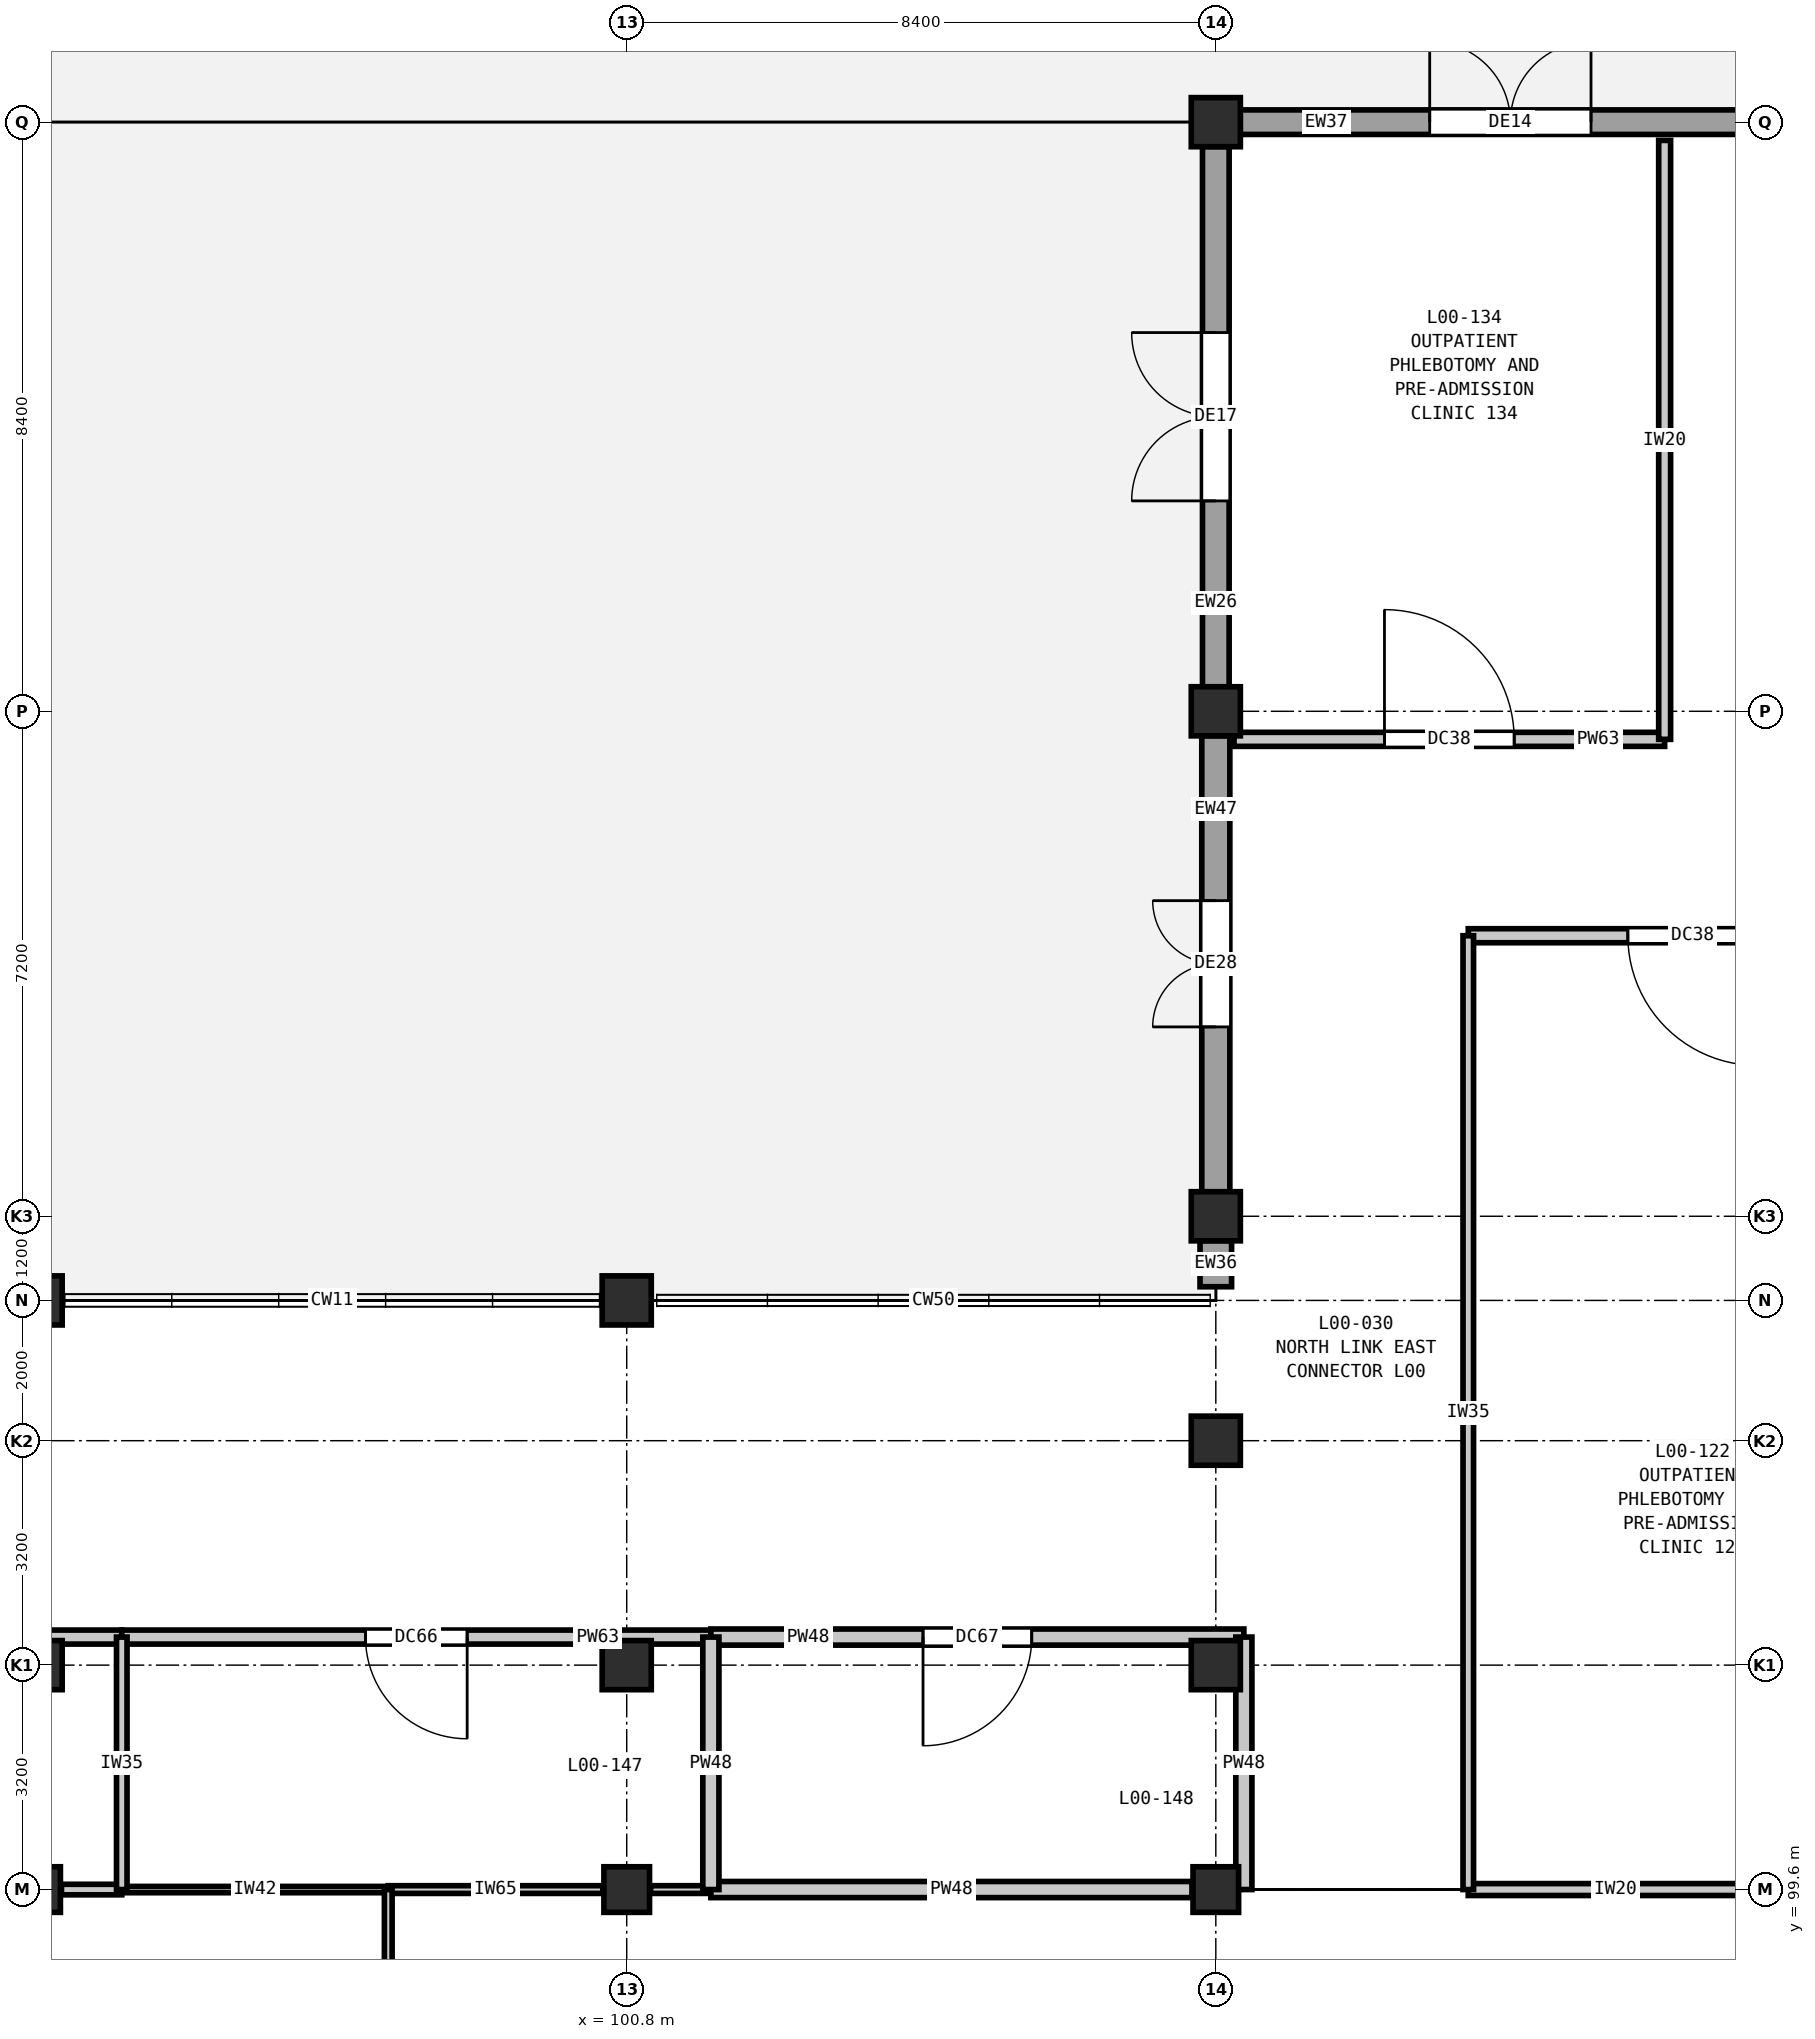
"""IFC4 building model, lengths in metres.
Left out: names, types, materials, properties, quantities, classifications, styles, units other than length and angle.
Written with IfcOpenShell. Run it as: python <this file> out.ifc"""

import sys

from ifc_helpers import new_model, si_unit, direction, frame, frame_2d, origin, origin_2d, place, context, subcontext, project, spatial, rectangle, extrude, element, fill, save


model = new_model("IFC4")
c1 = context("Model", 3, precision=1e-05, world=origin(), true_north=direction((0.0, 1.0)))
c2 = subcontext(c1, "Body", "Model", "MODEL_VIEW")
j1 = project(units=[si_unit("LENGTHUNIT", "METRE"), si_unit("PLANEANGLEUNIT", "RADIAN")], contexts=[c1])
p1 = place(None, origin())
s1 = spatial("IfcSite", under=j1, at=p1, CompositionType="ELEMENT")
p2 = place(p1, origin())
s2 = spatial("IfcBuilding", under=s1, at=p2, CompositionType="ELEMENT")
p3 = place(p2, origin())
s3 = spatial("IfcBuildingStorey", under=s2, at=p3, CompositionType="ELEMENT", Elevation=0.0)
p4 = place(p3, frame((92.4, 99.6, 0.0), z_axis=(0.0, 0.0, 1.0), x_axis=(1.0, 0.0, 0.0)))
e1 = element("IfcColumn", 1, at=p4, inside=s3, PredefinedType="COLUMN", context=c2, shape_type="SweptSolid", body=[
    extrude(rectangle(XDim=0.65, YDim=0.65, at=origin_2d()), origin(), (0.0, 0.0, 1.0), 5.4),
])
for number, where, z_axis, x_axis in (
    (2, (92.4, 102.8, 0.0), (0.0, 0.0, 1.0), (1.0, 0.0, 0.0)),
    (3, (92.4, 108.0, 0.0), (0.0, 0.0, 1.0), (1.0, 0.0, 0.0)),
):
    element("IfcColumn", number, at=place(p3, frame(where, z_axis=z_axis, x_axis=x_axis)), inside=s3, PredefinedType="COLUMN", context=c2, shape_type="SweptSolid", body=[
        extrude(rectangle(XDim=0.7, YDim=0.7, at=origin_2d()), origin(), (0.0, 0.0, 1.0), 5.4),
    ])
p5 = place(p3, frame((100.8, 99.6, 0.0), z_axis=(0.0, 0.0, 1.0), x_axis=(1.0, 0.0, 0.0)))
e4 = element("IfcColumn", 4, at=p5, inside=s3, PredefinedType="COLUMN", context=c2, shape_type="SweptSolid", body=[
    extrude(rectangle(XDim=0.65, YDim=0.65, at=origin_2d()), origin(), (0.0, 0.0, 1.0), 5.4),
])
for number, where, z_axis, x_axis in (
    (5, (100.8, 102.8, 0.0), (0.0, 0.0, 1.0), (1.0, 0.0, 0.0)),
    (6, (100.8, 108.0, 0.0), (0.0, 0.0, 1.0), (1.0, 0.0, 0.0)),
):
    element("IfcColumn", number, at=place(p3, frame(where, z_axis=z_axis, x_axis=x_axis)), inside=s3, PredefinedType="COLUMN", context=c2, shape_type="SweptSolid", body=[
        extrude(rectangle(XDim=0.7, YDim=0.7, at=origin_2d()), origin(), (0.0, 0.0, 1.0), 5.4),
    ])
p6 = place(p3, frame((109.2, 99.6, 0.0), z_axis=(0.0, 0.0, 1.0), x_axis=(1.0, 0.0, 0.0)))
e7 = element("IfcColumn", 7, at=p6, inside=s3, PredefinedType="COLUMN", context=c2, shape_type="SweptSolid", body=[
    extrude(rectangle(XDim=0.65, YDim=0.65, at=origin_2d()), origin(), (0.0, 0.0, 1.0), 5.4),
])
for number, where, z_axis, x_axis in (
    (8, (109.2, 102.8, 0.0), (0.0, 0.0, 1.0), (1.0, 0.0, 0.0)),
    (9, (109.2, 106.0, 0.0), (0.0, 0.0, 1.0), (1.0, 0.0, 0.0)),
    (10, (109.2, 109.2, 0.0), (0.0, 0.0, 1.0), (1.0, 0.0, 0.0)),
    (11, (109.2, 116.4, 0.0), (0.0, 0.0, 1.0), (1.0, 0.0, 0.0)),
    (12, (109.2, 124.8, 0.0), (0.0, 0.0, 1.0), (1.0, 0.0, 0.0)),
):
    element("IfcColumn", number, at=place(p3, frame(where, z_axis=z_axis, x_axis=x_axis)), inside=s3, PredefinedType="COLUMN", context=c2, shape_type="SweptSolid", body=[
        extrude(rectangle(XDim=0.7, YDim=0.7, at=origin_2d()), origin(), (0.0, 0.0, 1.0), 5.4),
    ])
p7 = place(p3, frame((109.2, 108.195, 0.0), z_axis=(0.0, 0.0, 1.0), x_axis=(0.0, 1.0, 0.0)))
e13 = element("IfcWall", 13, at=p7, inside=s3, PredefinedType="SOLIDWALL", context=c2, shape_type="SweptSolid", body=[
    extrude(rectangle(XDim=0.657, YDim=0.45, at=frame_2d((0.329, 0.0))), origin(), (0.0, 0.0, 1.0), 4.68),
])
p8 = place(p3, frame((109.2, 109.548, 0.0), z_axis=(0.0, 0.0, 1.0), x_axis=(0.0, 1.0, 0.0)))
e14 = element("IfcWall", 14, at=p8, inside=s3, PredefinedType="SOLIDWALL", context=c2, shape_type="SweptSolid", body=[
    extrude(rectangle(XDim=6.504, YDim=0.4, at=frame_2d((3.252, 0.0))), origin(), (0.0, 0.0, 1.0), 4.68),
])
p9 = place(p8, frame((2.352, 0.0, 0.0)))
e15 = element("IfcOpeningElement", 15, at=p9, cuts=e14, PredefinedType="OPENING", context=c2, shape_type="SweptSolid", body=[
    extrude(rectangle(XDim=1.8, YDim=2.25, at=frame_2d((0.9, 1.125))), frame((0.0, 0.21, 0.0), z_axis=(0.0, -1.0, 0.0), x_axis=(1.0, 0.0, 0.0)), (0.0, 0.0, 1.0), 0.42),
])
p10 = place(p3, frame((109.2, 116.748, 0.0), z_axis=(0.0, 0.0, 1.0), x_axis=(0.0, 1.0, 0.0)))
e16 = element("IfcWall", 16, at=p10, inside=s3, PredefinedType="SOLIDWALL", context=c2, shape_type="SweptSolid", body=[
    extrude(rectangle(XDim=7.704, YDim=0.38, at=frame_2d((3.852, 0.0))), origin(), (0.0, 0.0, 1.0), 4.68),
])
p11 = place(p10, frame((2.652, 0.0, 0.0)))
e17 = element("IfcOpeningElement", 17, at=p11, cuts=e16, PredefinedType="OPENING", context=c2, shape_type="SweptSolid", body=[
    extrude(rectangle(XDim=2.4, YDim=2.6, at=frame_2d((1.2, 1.3))), frame((0.0, 0.2, 0.0), z_axis=(0.0, -1.0, 0.0), x_axis=(1.0, 0.0, 0.0)), (0.0, 0.0, 1.0), 0.4),
])
p12 = place(p3, frame((109.548, 124.8, 0.0), z_axis=(0.0, 0.0, 1.0), x_axis=(1.0, 0.0, 0.0)))
e18 = element("IfcWall", 18, at=p12, inside=s3, PredefinedType="SOLIDWALL", context=c2, shape_type="SweptSolid", body=[
    extrude(rectangle(XDim=7.704, YDim=0.35, at=frame_2d((3.852, 0.0))), origin(), (0.0, 0.0, 1.0), 4.68),
])
p13 = place(p12, frame((2.702, 0.0, 0.0)))
e19 = element("IfcOpeningElement", 19, at=p13, cuts=e18, PredefinedType="OPENING", context=c2, shape_type="SweptSolid", body=[
    extrude(rectangle(XDim=2.3, YDim=2.5, at=frame_2d((1.15, 1.25))), frame((0.0, 0.185, 0.0), z_axis=(0.0, -1.0, 0.0), x_axis=(1.0, 0.0, 0.0)), (0.0, 0.0, 1.0), 0.37),
])
p14 = place(p3, frame((92.74, 99.6, 0.0), z_axis=(0.0, 0.0, 1.0), x_axis=(1.0, 0.0, 0.0)))
e20 = element("IfcWall", 20, at=p14, inside=s3, PredefinedType="PARTITIONING", context=c2, shape_type="SweptSolid", body=[
    extrude(rectangle(XDim=0.86, YDim=0.15, at=frame_2d((0.43, 0.0))), origin(), (0.0, 0.0, 1.0), 4.635),
])
p15 = place(p3, frame((93.6, 99.6, 0.0), z_axis=(0.0, 0.0, 1.0), x_axis=(1.0, 0.0, 0.0)))
e21 = element("IfcWall", 21, at=p15, inside=s3, PredefinedType="PARTITIONING", context=c2, shape_type="SweptSolid", body=[
    extrude(rectangle(XDim=3.8, YDim=0.09, at=frame_2d((1.9, 0.0))), origin(), (0.0, 0.0, 1.0), 4.635),
])
p16 = place(p3, frame((97.4, 99.6, 0.0), z_axis=(0.0, 0.0, 1.0), x_axis=(1.0, 0.0, 0.0)))
e22 = element("IfcWall", 22, at=p16, inside=s3, PredefinedType="PARTITIONING", context=c2, shape_type="SweptSolid", body=[
    extrude(rectangle(XDim=3.06, YDim=0.11, at=frame_2d((1.53, 0.0))), origin(), (0.0, 0.0, 1.0), 4.635),
])
p17 = place(p3, frame((101.14, 99.6, 0.0), z_axis=(0.0, 0.0, 1.0), x_axis=(1.0, 0.0, 0.0)))
e23 = element("IfcWall", 23, at=p17, inside=s3, PredefinedType="PARTITIONING", context=c2, shape_type="SweptSolid", body=[
    extrude(rectangle(XDim=0.86, YDim=0.11, at=frame_2d((0.43, 0.0))), origin(), (0.0, 0.0, 1.0), 4.635),
])
p18 = place(p3, frame((102.0, 99.6, 0.0), z_axis=(0.0, 0.0, 1.0), x_axis=(1.0, 0.0, 0.0)))
e24 = element("IfcWall", 24, at=p18, inside=s3, PredefinedType="PARTITIONING", context=c2, shape_type="SweptSolid", body=[
    extrude(rectangle(XDim=6.86, YDim=0.23, at=frame_2d((3.43, 0.0))), origin(), (0.0, 0.0, 1.0), 4.635),
])
p19 = place(p3, frame((112.8, 99.6, 0.0), z_axis=(0.0, 0.0, 1.0), x_axis=(1.0, 0.0, 0.0)))
e25 = element("IfcWall", 25, at=p19, inside=s3, PredefinedType="PARTITIONING", context=c2, shape_type="SweptSolid", body=[
    extrude(rectangle(XDim=4.2, YDim=0.17, at=frame_2d((2.1, 0.0))), origin(), (0.0, 0.0, 1.0), 4.635),
])
p20 = place(p3, frame((87.2, 103.2, 0.0), z_axis=(0.0, 0.0, 1.0), x_axis=(1.0, 0.0, 0.0)))
e26 = element("IfcWall", 26, at=p20, inside=s3, PredefinedType="PARTITIONING", context=c2, shape_type="SweptSolid", body=[
    extrude(rectangle(XDim=6.4, YDim=0.2, at=frame_2d((3.2, 0.0))), origin(), (0.0, 0.0, 1.0), 5.04),
])
p21 = place(p20, frame((2.525, 0.0, 0.0)))
e27 = element("IfcOpeningElement", 27, at=p21, cuts=e26, PredefinedType="OPENING", context=c2, shape_type="SweptSolid", body=[
    extrude(rectangle(XDim=1.35, YDim=2.2, at=frame_2d((0.675, 1.1))), frame((0.0, 0.11, 0.0), z_axis=(0.0, -1.0, 0.0), x_axis=(1.0, 0.0, 0.0)), (0.0, 0.0, 1.0), 0.22),
])
p22 = place(p3, frame((93.6, 103.2, 0.0), z_axis=(0.0, 0.0, 1.0), x_axis=(1.0, 0.0, 0.0)))
e28 = element("IfcWall", 28, at=p22, inside=s3, PredefinedType="PARTITIONING", context=c2, shape_type="SweptSolid", body=[
    extrude(rectangle(XDim=8.4, YDim=0.2, at=frame_2d((4.2, 0.0))), origin(), (0.0, 0.0, 1.0), 5.04),
])
p23 = place(p22, frame((3.475, 0.0, 0.0)))
e29 = element("IfcOpeningElement", 29, at=p23, cuts=e28, PredefinedType="OPENING", context=c2, shape_type="SweptSolid", body=[
    extrude(rectangle(XDim=1.45, YDim=2.25, at=frame_2d((0.725, 1.125))), frame((0.0, 0.11, 0.0), z_axis=(0.0, -1.0, 0.0), x_axis=(1.0, 0.0, 0.0)), (0.0, 0.0, 1.0), 0.22),
])
p24 = place(p3, frame((102.0, 103.2, 0.0), z_axis=(0.0, 0.0, 1.0), x_axis=(1.0, 0.0, 0.0)))
e30 = element("IfcWall", 30, at=p24, inside=s3, PredefinedType="PARTITIONING", context=c2, shape_type="SweptSolid", body=[
    extrude(rectangle(XDim=7.6, YDim=0.23, at=frame_2d((3.8, 0.0))), origin(), (0.0, 0.0, 1.0), 5.04),
])
p25 = place(p24, frame((3.025, 0.0, 0.0)))
e31 = element("IfcOpeningElement", 31, at=p25, cuts=e30, PredefinedType="OPENING", context=c2, shape_type="SweptSolid", body=[
    extrude(rectangle(XDim=1.55, YDim=2.25, at=frame_2d((0.775, 1.125))), frame((0.0, 0.125, 0.0), z_axis=(0.0, -1.0, 0.0), x_axis=(1.0, 0.0, 0.0)), (0.0, 0.0, 1.0), 0.25),
])
p26 = place(p3, frame((112.8, 113.2, 0.0), z_axis=(0.0, 0.0, 1.0), x_axis=(1.0, 0.0, 0.0)))
e32 = element("IfcWall", 32, at=p26, inside=s3, PredefinedType="PARTITIONING", context=c2, shape_type="SweptSolid", body=[
    extrude(rectangle(XDim=6.4, YDim=0.2, at=frame_2d((3.2, 0.0))), origin(), (0.0, 0.0, 1.0), 5.04),
])
p27 = place(p26, frame((2.275, 0.0, 0.0)))
e33 = element("IfcOpeningElement", 33, at=p27, cuts=e32, PredefinedType="OPENING", context=c2, shape_type="SweptSolid", body=[
    extrude(rectangle(XDim=1.85, YDim=2.3, at=frame_2d((0.925, 1.15))), frame((0.0, 0.11, 0.0), z_axis=(0.0, -1.0, 0.0), x_axis=(1.0, 0.0, 0.0)), (0.0, 0.0, 1.0), 0.22),
])
p28 = place(p3, frame((109.46, 116.0, 0.0), z_axis=(0.0, 0.0, 1.0), x_axis=(1.0, 0.0, 0.0)))
e34 = element("IfcWall", 34, at=p28, inside=s3, PredefinedType="PARTITIONING", context=c2, shape_type="SweptSolid", body=[
    extrude(rectangle(XDim=6.14, YDim=0.2, at=frame_2d((3.07, 0.0))), origin(), (0.0, 0.0, 1.0), 5.04),
])
p29 = place(p28, frame((2.145, 0.0, 0.0)))
e35 = element("IfcOpeningElement", 35, at=p29, cuts=e34, PredefinedType="OPENING", context=c2, shape_type="SweptSolid", body=[
    extrude(rectangle(XDim=1.85, YDim=2.3, at=frame_2d((0.925, 1.15))), frame((0.0, 0.11, 0.0), z_axis=(0.0, -1.0, 0.0), x_axis=(1.0, 0.0, 0.0)), (0.0, 0.0, 1.0), 0.22),
])
p30 = place(p3, frame((93.6, 99.6, 0.0), z_axis=(0.0, 0.0, 1.0), x_axis=(0.0, 1.0, 0.0)))
e36 = element("IfcWall", 36, at=p30, inside=s3, PredefinedType="PARTITIONING", context=c2, shape_type="SweptSolid", body=[
    extrude(rectangle(XDim=3.6, YDim=0.15, at=frame_2d((1.8, 0.0))), origin(), (0.0, 0.0, 1.0), 5.04),
])
p31 = place(p3, frame((97.4, 88.6, 0.0), z_axis=(0.0, 0.0, 1.0), x_axis=(0.0, 1.0, 0.0)))
e37 = element("IfcWall", 37, at=p31, inside=s3, PredefinedType="PARTITIONING", context=c2, shape_type="SweptSolid", body=[
    extrude(rectangle(XDim=11.0, YDim=0.11, at=frame_2d((5.5, 0.0))), origin(), (0.0, 0.0, 1.0), 5.04),
])
for number, where, z_axis, x_axis in (
    (38, (102.0, 99.6, 0.0), (0.0, 0.0, 1.0), (0.0, 1.0, 0.0)),
    (39, (109.6, 99.6, 0.0), (0.0, 0.0, 1.0), (0.0, 1.0, 0.0)),
):
    element("IfcWall", number, at=place(p3, frame(where, z_axis=z_axis, x_axis=x_axis)), inside=s3, PredefinedType="PARTITIONING", context=c2, shape_type="SweptSolid", body=[
        extrude(rectangle(XDim=3.6, YDim=0.23, at=frame_2d((1.8, 0.0))), origin(), (0.0, 0.0, 1.0), 5.04),
    ])
p32 = place(p3, frame((112.8, 99.6, 0.0), z_axis=(0.0, 0.0, 1.0), x_axis=(0.0, 1.0, 0.0)))
e40 = element("IfcWall", 40, at=p32, inside=s3, PredefinedType="PARTITIONING", context=c2, shape_type="SweptSolid", body=[
    extrude(rectangle(XDim=13.6, YDim=0.15, at=frame_2d((6.8, 0.0))), origin(), (0.0, 0.0, 1.0), 5.04),
])
p33 = place(p3, frame((115.6, 116.0, 0.0), z_axis=(0.0, 0.0, 1.0), x_axis=(0.0, 1.0, 0.0)))
e41 = element("IfcWall", 41, at=p33, inside=s3, PredefinedType="PARTITIONING", context=c2, shape_type="SweptSolid", body=[
    extrude(rectangle(XDim=8.54, YDim=0.17, at=frame_2d((4.27, 0.0))), origin(), (0.0, 0.0, 1.0), 5.04),
])
p34 = place(p9, origin())
e42 = element("IfcDoor", 42, at=p34, inside=s3, OperationType="DOUBLE_DOOR_SINGLE_SWING", PredefinedType="DOOR", context=c2, shape_type="SweptSolid", body=[
    extrude(rectangle(XDim=1.8, YDim=2.25, at=frame_2d((0.9, 1.125))), frame((0.0, 0.025, 0.0), z_axis=(0.0, -1.0, 0.0), x_axis=(1.0, 0.0, 0.0)), (0.0, 0.0, 1.0), 0.05),
])
fill(e15, e42)
p35 = place(p11, origin())
e43 = element("IfcDoor", 43, at=p35, inside=s3, OperationType="DOUBLE_DOOR_SINGLE_SWING", PredefinedType="DOOR", context=c2, shape_type="SweptSolid", body=[
    extrude(rectangle(XDim=2.4, YDim=2.6, at=frame_2d((1.2, 1.3))), frame((0.0, 0.025, 0.0), z_axis=(0.0, -1.0, 0.0), x_axis=(1.0, 0.0, 0.0)), (0.0, 0.0, 1.0), 0.05),
])
fill(e17, e43)
p36 = place(p13, origin())
e44 = element("IfcDoor", 44, at=p36, inside=s3, OperationType="DOUBLE_DOOR_SINGLE_SWING", PredefinedType="DOOR", context=c2, shape_type="SweptSolid", body=[
    extrude(rectangle(XDim=2.3, YDim=2.5, at=frame_2d((1.15, 1.25))), frame((0.0, 0.025, 0.0), z_axis=(0.0, -1.0, 0.0), x_axis=(1.0, 0.0, 0.0)), (0.0, 0.0, 1.0), 0.05),
])
fill(e19, e44)
p37 = place(p23, frame((1.45, 0.0, 0.0), z_axis=(0.0, 0.0, 1.0), x_axis=(-1.0, 0.0, 0.0)))
e45 = element("IfcDoor", 45, at=p37, inside=s3, OperationType="SINGLE_SWING_LEFT", PredefinedType="DOOR", context=c2, shape_type="SweptSolid", body=[
    extrude(rectangle(XDim=1.45, YDim=2.25, at=frame_2d((0.725, 1.125))), frame((0.0, 0.025, 0.0), z_axis=(0.0, -1.0, 0.0), x_axis=(1.0, 0.0, 0.0)), (0.0, 0.0, 1.0), 0.05),
])
fill(e29, e45)
p38 = place(p25, frame((1.55, 0.0, 0.0), z_axis=(0.0, 0.0, 1.0), x_axis=(-1.0, 0.0, 0.0)))
e46 = element("IfcDoor", 46, at=p38, inside=s3, OperationType="SINGLE_SWING_RIGHT", PredefinedType="DOOR", context=c2, shape_type="SweptSolid", body=[
    extrude(rectangle(XDim=1.55, YDim=2.25, at=frame_2d((0.775, 1.125))), frame((0.0, 0.025, 0.0), z_axis=(0.0, -1.0, 0.0), x_axis=(1.0, 0.0, 0.0)), (0.0, 0.0, 1.0), 0.05),
])
fill(e31, e46)
p39 = place(p27, frame((1.85, 0.0, 0.0), z_axis=(0.0, 0.0, 1.0), x_axis=(-1.0, 0.0, 0.0)))
e47 = element("IfcDoor", 47, at=p39, inside=s3, OperationType="SINGLE_SWING_LEFT", PredefinedType="DOOR", context=c2, shape_type="SweptSolid", body=[
    extrude(rectangle(XDim=1.85, YDim=2.3, at=frame_2d((0.925, 1.15))), frame((0.0, 0.025, 0.0), z_axis=(0.0, -1.0, 0.0), x_axis=(1.0, 0.0, 0.0)), (0.0, 0.0, 1.0), 0.05),
])
fill(e33, e47)
p40 = place(p29, origin())
e48 = element("IfcDoor", 48, at=p40, inside=s3, OperationType="SINGLE_SWING_LEFT", PredefinedType="DOOR", context=c2, shape_type="SweptSolid", body=[
    extrude(rectangle(XDim=1.85, YDim=2.3, at=frame_2d((0.925, 1.15))), frame((0.0, 0.025, 0.0), z_axis=(0.0, -1.0, 0.0), x_axis=(1.0, 0.0, 0.0)), (0.0, 0.0, 1.0), 0.05),
])
fill(e35, e48)
save(model, sys.argv[1])
